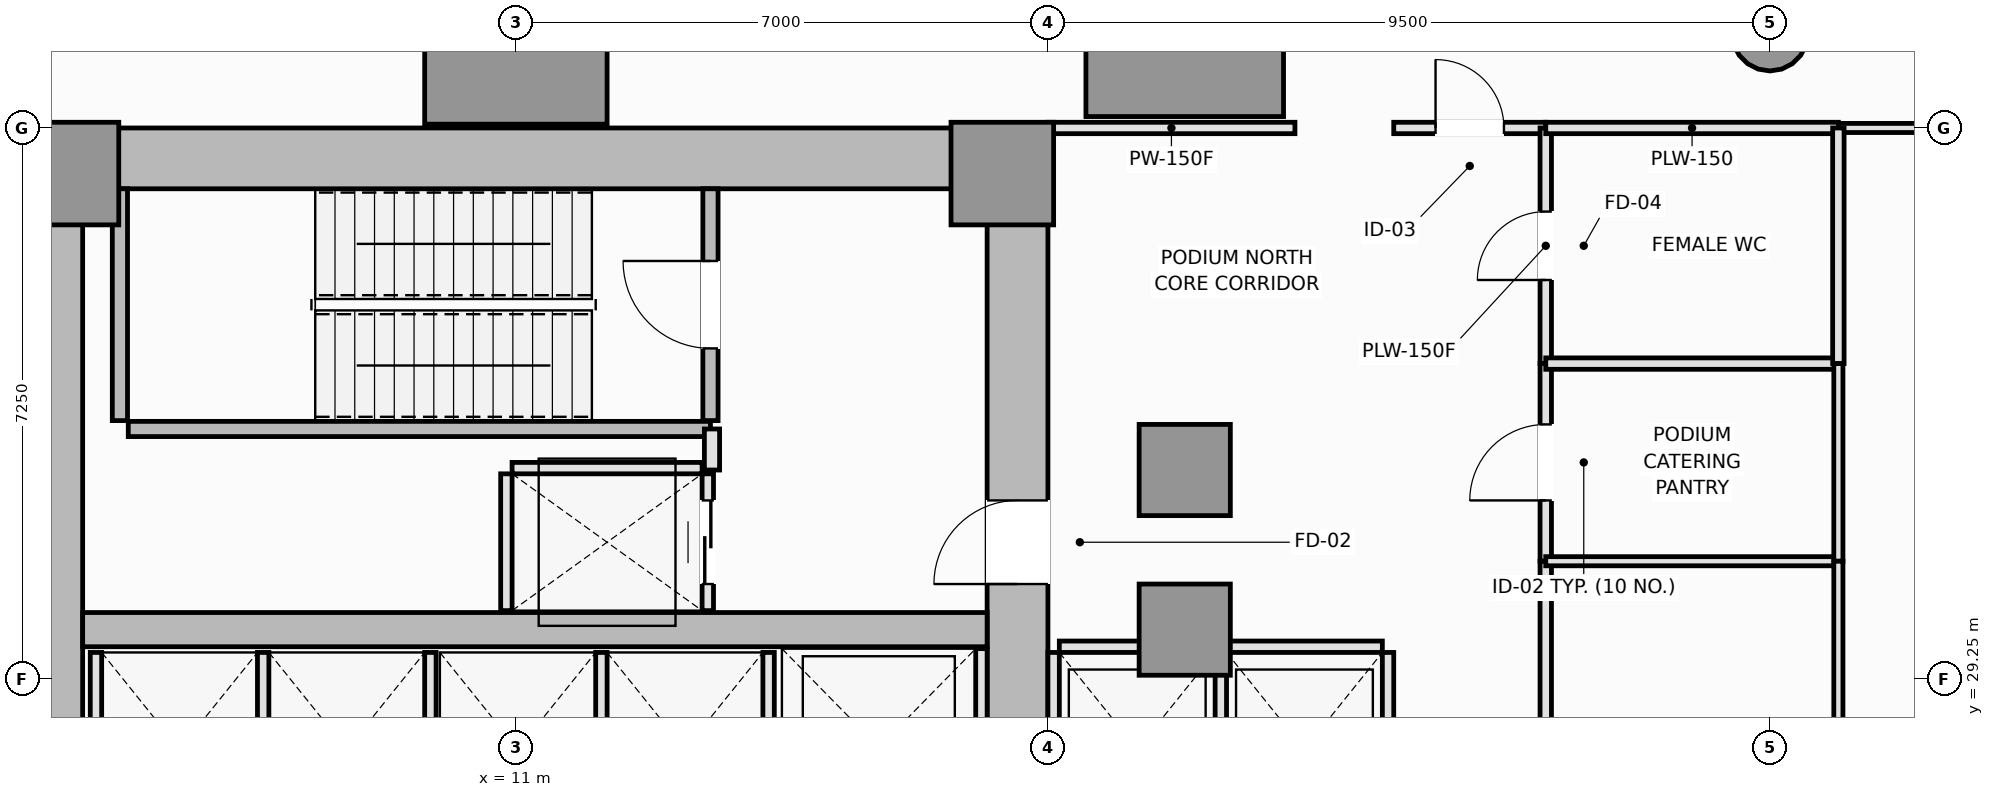
"""IFC4 building model, lengths in metres.
Left out: names, types, materials, properties, quantities, classifications, styles, units other than length and angle.
Written with IfcOpenShell. Run it as: python <this file> out.ifc"""

import sys

from ifc_helpers import new_model, si_unit, direction, frame, frame_2d, origin, origin_2d, place, context, subcontext, project, spatial, rectangle, circle, extrude, element, fill, save


model = new_model("IFC4")
c1 = context("Model", 3, precision=1e-05, world=origin(), true_north=direction((0.0, 1.0)))
c2 = subcontext(c1, "Body", "Model", "MODEL_VIEW")
j1 = project(units=[si_unit("LENGTHUNIT", "METRE"), si_unit("PLANEANGLEUNIT", "RADIAN")], contexts=[c1])
p1 = place(None, origin())
s1 = spatial("IfcSite", under=j1, at=p1, CompositionType="ELEMENT")
p2 = place(p1, origin())
s2 = spatial("IfcBuilding", under=s1, at=p2, CompositionType="ELEMENT")
p3 = place(p2, frame((0.0, 0.0, 15.6)))
s3 = spatial("IfcBuildingStorey", under=s2, at=p3, CompositionType="ELEMENT", Elevation=15.6)
p4 = place(p3, frame((4.5, 36.1, 0.0), z_axis=(0.0, 0.0, 1.0), x_axis=(1.0, 0.0, 0.0)))
e1 = element("IfcWall", 1, at=p4, inside=s3, PredefinedType="SHEAR", context=c2, shape_type="SweptSolid", body=[
    extrude(rectangle(XDim=13.5, YDim=0.8, at=frame_2d((6.75, 0.0))), origin(), (0.0, 0.0, 1.0), 4.8),
])
p5 = place(p3, frame((4.9, 14.8, 0.0), z_axis=(0.0, 0.0, 1.0), x_axis=(0.0, 1.0, 0.0)))
e2 = element("IfcWall", 2, at=p5, inside=s3, PredefinedType="SHEAR", context=c2, shape_type="SweptSolid", body=[
    extrude(rectangle(XDim=20.9, YDim=0.8, at=frame_2d((10.45, 0.0))), origin(), (0.0, 0.0, 1.0), 4.8),
])
p6 = place(p3, frame((17.6, 27.05, 0.0), z_axis=(0.0, 0.0, 1.0), x_axis=(0.0, 1.0, 0.0)))
e3 = element("IfcWall", 3, at=p6, inside=s3, PredefinedType="SHEAR", context=c2, shape_type="SweptSolid", body=[
    extrude(rectangle(XDim=8.65, YDim=0.8, at=frame_2d((4.325, 0.0))), origin(), (0.0, 0.0, 1.0), 4.8),
])
p7 = place(p6, frame((3.45, 0.0, 0.0)))
e4 = element("IfcOpeningElement", 4, at=p7, cuts=e3, PredefinedType="OPENING", context=c2, shape_type="SweptSolid", body=[
    extrude(rectangle(XDim=1.1, YDim=2.15, at=frame_2d((0.55, 1.075))), frame((0.0, 0.41, 0.0), z_axis=(0.0, -1.0, 0.0), x_axis=(1.0, 0.0, 0.0)), (0.0, 0.0, 1.0), 0.82),
])
p8 = place(p3, frame((5.3, 29.9, 0.0), z_axis=(0.0, 0.0, 1.0), x_axis=(1.0, 0.0, 0.0)))
e5 = element("IfcWall", 5, at=p8, inside=s3, PredefinedType="SHEAR", context=c2, shape_type="SweptSolid", body=[
    extrude(rectangle(XDim=11.9, YDim=0.45, at=frame_2d((5.95, 0.0))), origin(), (0.0, 0.0, 1.0), 4.8),
])
for number, where, z_axis, x_axis in (
    (6, (5.1, 35.9, 0.0), (0.0, 0.0, 1.0), (1.0, 0.0, 0.0)),
    (7, (17.4, 35.9, 0.0), (0.0, 0.0, 1.0), (1.0, 0.0, 0.0)),
):
    element("IfcColumn", number, at=place(p3, frame(where, z_axis=z_axis, x_axis=x_axis)), inside=s3, PredefinedType="PILASTER", context=c2, shape_type="SweptSolid", body=[
        extrude(rectangle(XDim=1.35, YDim=1.35, at=origin_2d()), origin(), (0.0, 0.0, 1.0), 4.8),
    ])
p9 = place(p3, frame((11.0, 37.75, 0.0), z_axis=(0.0, 0.0, 1.0), x_axis=(1.0, 0.0, 0.0)))
e8 = element("IfcColumn", 8, at=p9, inside=s3, PredefinedType="COLUMN", context=c2, shape_type="SweptSolid", body=[
    extrude(rectangle(XDim=2.4, YDim=2.4, at=origin_2d()), origin(), (0.0, 0.0, 1.0), 4.8),
])
p10 = place(p3, frame((19.8, 37.75, 0.0), z_axis=(0.0, 0.0, 1.0), x_axis=(1.0, 0.0, 0.0)))
e9 = element("IfcColumn", 9, at=p10, inside=s3, PredefinedType="COLUMN", context=c2, shape_type="SweptSolid", body=[
    extrude(rectangle(XDim=2.6, YDim=2.2, at=origin_2d()), origin(), (0.0, 0.0, 1.0), 4.8),
])
for number, where, z_axis, x_axis in (
    (10, (19.8, 29.9, 0.0), (0.0, 0.0, 1.0), (1.0, 0.0, 0.0)),
    (11, (19.8, 32.0, 0.0), (0.0, 0.0, 1.0), (1.0, 0.0, 0.0)),
):
    element("IfcColumn", number, at=place(p3, frame(where, z_axis=z_axis, x_axis=x_axis)), inside=s3, PredefinedType="COLUMN", context=c2, shape_type="SweptSolid", body=[
        extrude(rectangle(XDim=1.2, YDim=1.2, at=origin_2d()), origin(), (0.0, 0.0, 1.0), 4.8),
    ])
p11 = place(p3, frame((27.5, 37.75, 0.0), z_axis=(0.0, 0.0, 1.0), x_axis=(1.0, 0.0, 0.0)))
e12 = element("IfcColumn", 12, at=p11, inside=s3, PredefinedType="COLUMN", context=c2, shape_type="SweptSolid", body=[
    extrude(circle(Radius=0.5, at=origin_2d()), origin(), (0.0, 0.0, 1.0), 4.8),
])
p12 = place(p3, frame((5.79, 32.65, 0.0), z_axis=(0.0, 0.0, 1.0), x_axis=(0.0, 1.0, 0.0)))
e13 = element("IfcWall", 13, at=p12, inside=s3, PredefinedType="SOLIDWALL", context=c2, shape_type="SweptSolid", body=[
    extrude(rectangle(XDim=3.05, YDim=0.2, at=frame_2d((1.525, 0.0))), origin(), (0.0, 0.0, 1.0), 4.8),
])
p13 = place(p3, frame((5.9, 32.54, 0.0), z_axis=(0.0, 0.0, 1.0), x_axis=(1.0, 0.0, 0.0)))
e14 = element("IfcWall", 14, at=p13, inside=s3, PredefinedType="SOLIDWALL", context=c2, shape_type="SweptSolid", body=[
    extrude(rectangle(XDim=7.66, YDim=0.2, at=frame_2d((3.83, 0.0))), origin(), (0.0, 0.0, 1.0), 4.8),
])
p14 = place(p3, frame((13.56, 32.65, 0.0), z_axis=(0.0, 0.0, 1.0), x_axis=(0.0, 1.0, 0.0)))
e15 = element("IfcWall", 15, at=p14, inside=s3, PredefinedType="SOLIDWALL", context=c2, shape_type="SweptSolid", body=[
    extrude(rectangle(XDim=3.05, YDim=0.2, at=frame_2d((1.525, 0.0))), origin(), (0.0, 0.0, 1.0), 4.8),
])
p15 = place(p14, frame((0.95, 0.0, 0.0)))
e16 = element("IfcOpeningElement", 16, at=p15, cuts=e15, PredefinedType="OPENING", context=c2, shape_type="SweptSolid", body=[
    extrude(rectangle(XDim=1.15, YDim=2.15, at=frame_2d((0.575, 1.075))), frame((0.0, 0.11, 0.0), z_axis=(0.0, -1.0, 0.0), x_axis=(1.0, 0.0, 0.0)), (0.0, 0.0, 1.0), 0.22),
])
p16 = place(p3, frame((18.15, 29.675, 0.0), z_axis=(0.0, 0.0, 1.0), x_axis=(1.0, 0.0, 0.0)))
e17 = element("IfcWall", 17, at=p16, inside=s3, PredefinedType="PARTITIONING", context=c2, shape_type="SweptSolid", body=[
    extrude(rectangle(XDim=2.05, YDim=0.15, at=frame_2d((1.025, 0.0))), origin(), (0.0, 0.0, 1.0), 4.6),
])
for number, where, z_axis, x_axis in (
    (18, (18.075, 27.05, 0.0), (0.0, 0.0, 1.0), (0.0, 1.0, 0.0)),
    (19, (20.275, 27.05, 0.0), (0.0, 0.0, 1.0), (0.0, 1.0, 0.0)),
):
    element("IfcWall", number, at=place(p3, frame(where, z_axis=z_axis, x_axis=x_axis)), inside=s3, PredefinedType="PARTITIONING", context=c2, shape_type="SweptSolid", body=[
        extrude(rectangle(XDim=2.55, YDim=0.15, at=frame_2d((1.275, 0.0))), origin(), (0.0, 0.0, 1.0), 4.6),
    ])
p17 = place(p3, frame((20.35, 29.675, 0.0), z_axis=(0.0, 0.0, 1.0), x_axis=(1.0, 0.0, 0.0)))
e20 = element("IfcWall", 20, at=p17, inside=s3, PredefinedType="PARTITIONING", context=c2, shape_type="SweptSolid", body=[
    extrude(rectangle(XDim=2.05, YDim=0.15, at=frame_2d((1.025, 0.0))), origin(), (0.0, 0.0, 1.0), 4.6),
])
for number, where, z_axis, x_axis in (
    (21, (22.475, 27.05, 0.0), (0.0, 0.0, 1.0), (0.0, 1.0, 0.0)),
    (22, (5.475, 27.05, 0.0), (0.0, 0.0, 1.0), (0.0, 1.0, 0.0)),
    (23, (7.675, 27.05, 0.0), (0.0, 0.0, 1.0), (0.0, 1.0, 0.0)),
    (24, (9.875, 27.05, 0.0), (0.0, 0.0, 1.0), (0.0, 1.0, 0.0)),
    (25, (12.125, 27.05, 0.0), (0.0, 0.0, 1.0), (0.0, 1.0, 0.0)),
    (26, (14.325, 27.05, 0.0), (0.0, 0.0, 1.0), (0.0, 1.0, 0.0)),
):
    element("IfcWall", number, at=place(p3, frame(where, z_axis=z_axis, x_axis=x_axis)), inside=s3, PredefinedType="PARTITIONING", context=c2, shape_type="SweptSolid", body=[
        extrude(rectangle(XDim=2.55, YDim=0.15, at=frame_2d((1.275, 0.0))), origin(), (0.0, 0.0, 1.0), 4.6),
    ])
p18 = place(p3, frame((17.125, 27.05, 0.0), z_axis=(0.0, 0.0, 1.0), x_axis=(0.0, 1.0, 0.0)))
e27 = element("IfcWall", 27, at=p18, inside=s3, PredefinedType="PARTITIONING", context=c2, shape_type="SweptSolid", body=[
    extrude(rectangle(XDim=2.6, YDim=0.15, at=frame_2d((1.3, 0.0))), origin(), (0.0, 0.0, 1.0), 4.6),
])
p19 = place(p3, frame((10.95, 32.025, 0.0), z_axis=(0.0, 0.0, 1.0), x_axis=(1.0, 0.0, 0.0)))
e28 = element("IfcWall", 28, at=p19, inside=s3, PredefinedType="PARTITIONING", context=c2, shape_type="SweptSolid", body=[
    extrude(rectangle(XDim=2.5, YDim=0.15, at=frame_2d((1.25, 0.0))), origin(), (0.0, 0.0, 1.0), 4.6),
])
p20 = place(p3, frame((10.875, 30.15, 0.0), z_axis=(0.0, 0.0, 1.0), x_axis=(0.0, 1.0, 0.0)))
e29 = element("IfcWall", 29, at=p20, inside=s3, PredefinedType="PARTITIONING", context=c2, shape_type="SweptSolid", body=[
    extrude(rectangle(XDim=1.8, YDim=0.15, at=frame_2d((0.9, 0.0))), origin(), (0.0, 0.0, 1.0), 4.6),
])
p21 = place(p3, frame((13.525, 30.15, 0.0), z_axis=(0.0, 0.0, 1.0), x_axis=(0.0, 1.0, 0.0)))
e30 = element("IfcWall", 30, at=p21, inside=s3, PredefinedType="PARTITIONING", context=c2, shape_type="SweptSolid", body=[
    extrude(rectangle(XDim=1.8, YDim=0.15, at=frame_2d((0.9, 0.0))), origin(), (0.0, 0.0, 1.0), 4.6),
])
p22 = place(p21, frame((0.35, 0.0, 0.0)))
e31 = element("IfcOpeningElement", 31, at=p22, cuts=e30, PredefinedType="OPENING", context=c2, shape_type="SweptSolid", body=[
    extrude(rectangle(XDim=1.1, YDim=2.2, at=frame_2d((0.55, 1.1))), frame((0.0, 0.085, 0.0), z_axis=(0.0, -1.0, 0.0), x_axis=(1.0, 0.0, 0.0)), (0.0, 0.0, 1.0), 0.17),
])
p23 = place(p3, frame((13.58, 32.0, 0.0), z_axis=(0.0, 0.0, 1.0), x_axis=(0.0, 1.0, 0.0)))
e32 = element("IfcWall", 32, at=p23, inside=s3, PredefinedType="PARTITIONING", context=c2, shape_type="SweptSolid", body=[
    extrude(rectangle(XDim=0.54, YDim=0.2, at=frame_2d((0.27, 0.0))), origin(), (0.0, 0.0, 1.0), 4.6),
])
p24 = place(p3, frame((18.0, 36.5, 0.0), z_axis=(0.0, 0.0, 1.0), x_axis=(1.0, 0.0, 0.0)))
e33 = element("IfcWall", 33, at=p24, inside=s3, PredefinedType="PARTITIONING", context=c2, shape_type="SweptSolid", body=[
    extrude(rectangle(XDim=3.25, YDim=0.15, at=frame_2d((1.625, 0.0))), origin(), (0.0, 0.0, 1.0), 4.6),
])
p25 = place(p3, frame((22.55, 36.5, 0.0), z_axis=(0.0, 0.0, 1.0), x_axis=(1.0, 0.0, 0.0)))
e34 = element("IfcWall", 34, at=p25, inside=s3, PredefinedType="PARTITIONING", context=c2, shape_type="SweptSolid", body=[
    extrude(rectangle(XDim=2.0, YDim=0.15, at=frame_2d((1.0, 0.0))), origin(), (0.0, 0.0, 1.0), 4.6),
])
p26 = place(p25, frame((0.55, 0.0, 0.0)))
e35 = element("IfcOpeningElement", 35, at=p26, cuts=e34, PredefinedType="OPENING", context=c2, shape_type="SweptSolid", body=[
    extrude(rectangle(XDim=0.9, YDim=2.1, at=frame_2d((0.45, 1.05))), frame((0.0, 0.085, 0.0), z_axis=(0.0, -1.0, 0.0), x_axis=(1.0, 0.0, 0.0)), (0.0, 0.0, 1.0), 0.17),
])
p27 = place(p3, frame((24.55, 33.4, 0.0), z_axis=(0.0, 0.0, 1.0), x_axis=(0.0, 1.0, 0.0)))
e36 = element("IfcWall", 36, at=p27, inside=s3, PredefinedType="PLUMBINGWALL", context=c2, shape_type="SweptSolid", body=[
    extrude(rectangle(XDim=3.1, YDim=0.15, at=frame_2d((1.55, 0.0))), origin(), (0.0, 0.0, 1.0), 4.6),
])
p28 = place(p27, frame((1.1, 0.0, 0.0)))
e37 = element("IfcOpeningElement", 37, at=p28, cuts=e36, PredefinedType="OPENING", context=c2, shape_type="SweptSolid", body=[
    extrude(rectangle(XDim=0.9, YDim=2.1, at=frame_2d((0.45, 1.05))), frame((0.0, 0.085, 0.0), z_axis=(0.0, -1.0, 0.0), x_axis=(1.0, 0.0, 0.0)), (0.0, 0.0, 1.0), 0.17),
])
p29 = place(p3, frame((24.55, 30.8, 0.0), z_axis=(0.0, 0.0, 1.0), x_axis=(0.0, 1.0, 0.0)))
e38 = element("IfcWall", 38, at=p29, inside=s3, PredefinedType="PARTITIONING", context=c2, shape_type="SweptSolid", body=[
    extrude(rectangle(XDim=2.6, YDim=0.15, at=frame_2d((1.3, 0.0))), origin(), (0.0, 0.0, 1.0), 4.6),
])
p30 = place(p29, frame((0.8, 0.0, 0.0)))
e39 = element("IfcOpeningElement", 39, at=p30, cuts=e38, PredefinedType="OPENING", context=c2, shape_type="SweptSolid", body=[
    extrude(rectangle(XDim=1.0, YDim=2.15, at=frame_2d((0.5, 1.075))), frame((0.0, 0.085, 0.0), z_axis=(0.0, -1.0, 0.0), x_axis=(1.0, 0.0, 0.0)), (0.0, 0.0, 1.0), 0.17),
])
p31 = place(p3, frame((24.55, 21.7, 0.0), z_axis=(0.0, 0.0, 1.0), x_axis=(0.0, 1.0, 0.0)))
e40 = element("IfcWall", 40, at=p31, inside=s3, PredefinedType="PARTITIONING", context=c2, shape_type="SweptSolid", body=[
    extrude(rectangle(XDim=9.1, YDim=0.15, at=frame_2d((4.55, 0.0))), origin(), (0.0, 0.0, 1.0), 4.6),
])
p32 = place(p31, frame((4.05, 0.0, 0.0)))
e41 = element("IfcOpeningElement", 41, at=p32, cuts=e40, PredefinedType="OPENING", context=c2, shape_type="SweptSolid", body=[
    extrude(rectangle(XDim=1.0, YDim=2.15, at=frame_2d((0.5, 1.075))), frame((0.0, 0.085, 0.0), z_axis=(0.0, -1.0, 0.0), x_axis=(1.0, 0.0, 0.0)), (0.0, 0.0, 1.0), 0.17),
])
p33 = place(p3, frame((24.55, 36.5, 0.0), z_axis=(0.0, 0.0, 1.0), x_axis=(1.0, 0.0, 0.0)))
e42 = element("IfcWall", 42, at=p33, inside=s3, PredefinedType="PLUMBINGWALL", context=c2, shape_type="SweptSolid", body=[
    extrude(rectangle(XDim=3.85, YDim=0.15, at=frame_2d((1.925, 0.0))), origin(), (0.0, 0.0, 1.0), 4.6),
])
p34 = place(p3, frame((28.4, 36.5, 0.0), z_axis=(0.0, 0.0, 1.0), x_axis=(1.0, 0.0, 0.0)))
e43 = element("IfcWall", 43, at=p34, inside=s3, PredefinedType="PARTITIONING", context=c2, shape_type="SweptSolid", body=[
    extrude(rectangle(XDim=4.8, YDim=0.12, at=frame_2d((2.4, 0.0))), origin(), (0.0, 0.0, 1.0), 4.6),
])
p35 = place(p3, frame((24.55, 33.4, 0.0), z_axis=(0.0, 0.0, 1.0), x_axis=(1.0, 0.0, 0.0)))
e44 = element("IfcWall", 44, at=p35, inside=s3, PredefinedType="PLUMBINGWALL", context=c2, shape_type="SweptSolid", body=[
    extrude(rectangle(XDim=3.85, YDim=0.15, at=frame_2d((1.925, 0.0))), origin(), (0.0, 0.0, 1.0), 4.6),
])
p36 = place(p3, frame((28.4, 33.4, 0.0), z_axis=(0.0, 0.0, 1.0), x_axis=(0.0, 1.0, 0.0)))
e45 = element("IfcWall", 45, at=p36, inside=s3, PredefinedType="PLUMBINGWALL", context=c2, shape_type="SweptSolid", body=[
    extrude(rectangle(XDim=3.1, YDim=0.15, at=frame_2d((1.55, 0.0))), origin(), (0.0, 0.0, 1.0), 4.6),
])
p37 = place(p3, frame((24.55, 30.8, 0.0), z_axis=(0.0, 0.0, 1.0), x_axis=(1.0, 0.0, 0.0)))
e46 = element("IfcWall", 46, at=p37, inside=s3, PredefinedType="PARTITIONING", context=c2, shape_type="SweptSolid", body=[
    extrude(rectangle(XDim=3.85, YDim=0.12, at=frame_2d((1.925, 0.0))), origin(), (0.0, 0.0, 1.0), 4.6),
])
p38 = place(p3, frame((28.4, 30.8, 0.0), z_axis=(0.0, 0.0, 1.0), x_axis=(0.0, 1.0, 0.0)))
e47 = element("IfcWall", 47, at=p38, inside=s3, PredefinedType="PARTITIONING", context=c2, shape_type="SweptSolid", body=[
    extrude(rectangle(XDim=2.6, YDim=0.12, at=frame_2d((1.3, 0.0))), origin(), (0.0, 0.0, 1.0), 4.6),
])
p39 = place(p3, frame((28.4, 21.7, 0.0), z_axis=(0.0, 0.0, 1.0), x_axis=(0.0, 1.0, 0.0)))
e48 = element("IfcWall", 48, at=p39, inside=s3, PredefinedType="PARTITIONING", context=c2, shape_type="SweptSolid", body=[
    extrude(rectangle(XDim=9.1, YDim=0.12, at=frame_2d((4.55, 0.0))), origin(), (0.0, 0.0, 1.0), 4.6),
])
p40 = place(p15, origin())
e49 = element("IfcDoor", 49, at=p40, inside=s3, OperationType="SINGLE_SWING_RIGHT", PredefinedType="DOOR", context=c2, shape_type="SweptSolid", body=[
    extrude(rectangle(XDim=1.15, YDim=2.15, at=frame_2d((0.575, 1.075))), frame((0.0, 0.025, 0.0), z_axis=(0.0, -1.0, 0.0), x_axis=(1.0, 0.0, 0.0)), (0.0, 0.0, 1.0), 0.05),
])
fill(e16, e49)
p41 = place(p22, origin())
e50 = element("IfcDoor", 50, at=p41, inside=s3, OperationType="DOUBLE_DOOR_SLIDING", PredefinedType="DOOR", context=c2, shape_type="SweptSolid", body=[
    extrude(rectangle(XDim=1.1, YDim=2.2, at=frame_2d((0.55, 1.1))), frame((0.0, 0.025, 0.0), z_axis=(0.0, -1.0, 0.0), x_axis=(1.0, 0.0, 0.0)), (0.0, 0.0, 1.0), 0.05),
])
fill(e31, e50)
p42 = place(p7, origin())
e51 = element("IfcDoor", 51, at=p42, inside=s3, OperationType="SINGLE_SWING_LEFT", PredefinedType="DOOR", context=c2, shape_type="SweptSolid", body=[
    extrude(rectangle(XDim=1.1, YDim=2.15, at=frame_2d((0.55, 1.075))), frame((0.0, 0.025, 0.0), z_axis=(0.0, -1.0, 0.0), x_axis=(1.0, 0.0, 0.0)), (0.0, 0.0, 1.0), 0.05),
])
fill(e4, e51)
p43 = place(p26, origin())
e52 = element("IfcDoor", 52, at=p43, inside=s3, OperationType="SINGLE_SWING_LEFT", PredefinedType="DOOR", context=c2, shape_type="SweptSolid", body=[
    extrude(rectangle(XDim=0.9, YDim=2.1, at=frame_2d((0.45, 1.05))), frame((0.0, 0.025, 0.0), z_axis=(0.0, -1.0, 0.0), x_axis=(1.0, 0.0, 0.0)), (0.0, 0.0, 1.0), 0.05),
])
fill(e35, e52)
p44 = place(p28, origin())
e53 = element("IfcDoor", 53, at=p44, inside=s3, OperationType="SINGLE_SWING_LEFT", PredefinedType="DOOR", context=c2, shape_type="SweptSolid", body=[
    extrude(rectangle(XDim=0.9, YDim=2.1, at=frame_2d((0.45, 1.05))), frame((0.0, 0.025, 0.0), z_axis=(0.0, -1.0, 0.0), x_axis=(1.0, 0.0, 0.0)), (0.0, 0.0, 1.0), 0.05),
])
fill(e37, e53)
p45 = place(p30, origin())
e54 = element("IfcDoor", 54, at=p45, inside=s3, OperationType="SINGLE_SWING_LEFT", PredefinedType="DOOR", context=c2, shape_type="SweptSolid", body=[
    extrude(rectangle(XDim=1.0, YDim=2.15, at=frame_2d((0.5, 1.075))), frame((0.0, 0.025, 0.0), z_axis=(0.0, -1.0, 0.0), x_axis=(1.0, 0.0, 0.0)), (0.0, 0.0, 1.0), 0.05),
])
fill(e39, e54)
save(model, sys.argv[1])
